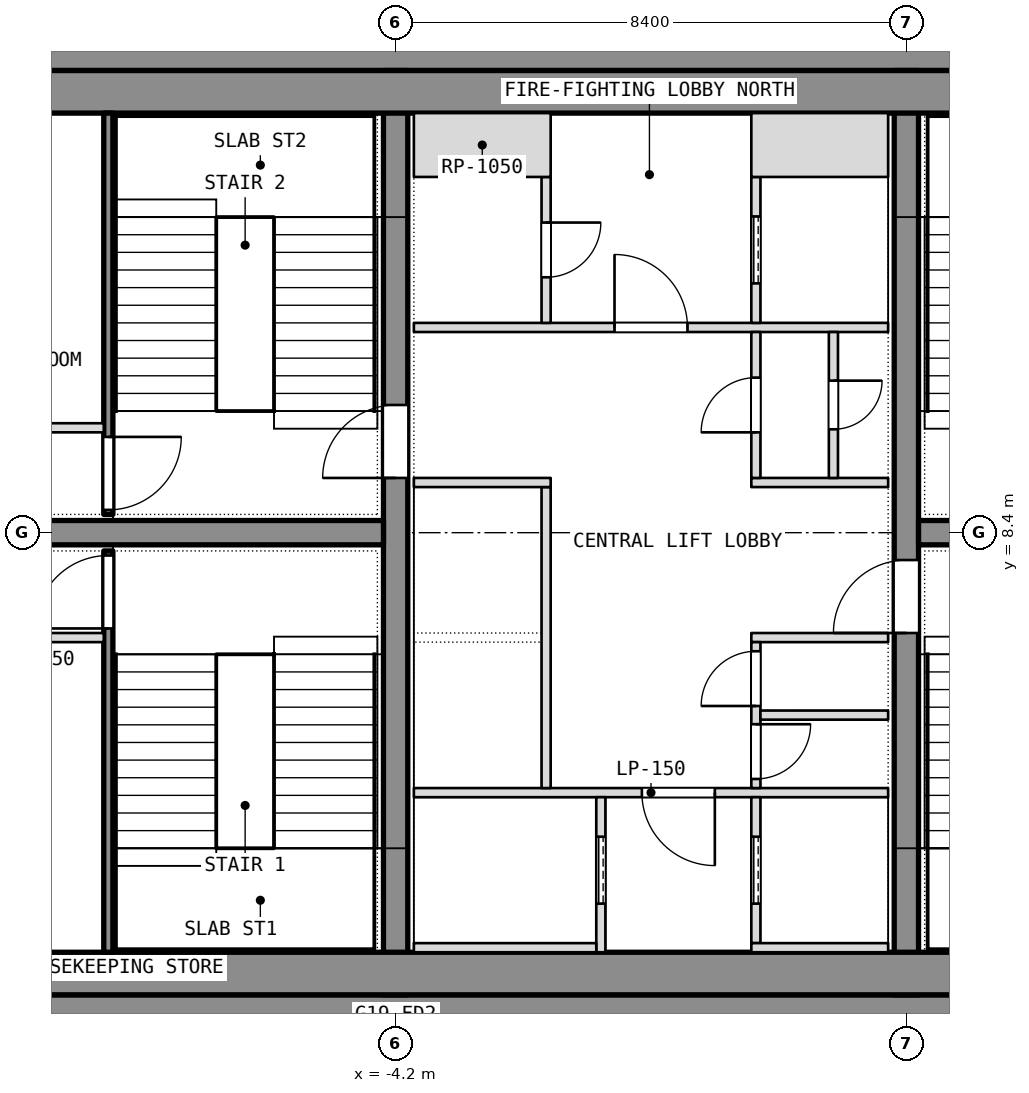
"""IFC4 building model, lengths in metres.
Left out: names, types, materials, properties, quantities, classifications, styles, units other than length and angle.
Written with IfcOpenShell. Run it as: python <this file> out.ifc"""

import sys

from ifc_helpers import new_model, si_unit, direction, frame, frame_2d, origin, place, context, subcontext, project, spatial, rectangle, extrude, element, fill, save


model = new_model("IFC4")
c1 = context("Model", 3, precision=1e-05, world=origin(), true_north=direction((0.0, 1.0)))
c2 = subcontext(c1, "Body", "Model", "MODEL_VIEW")
j1 = project(units=[si_unit("LENGTHUNIT", "METRE"), si_unit("PLANEANGLEUNIT", "RADIAN")], contexts=[c1])
p1 = place(None, origin())
s1 = spatial("IfcSite", under=j1, at=p1, CompositionType="ELEMENT")
p2 = place(p1, origin())
s2 = spatial("IfcBuilding", under=s1, at=p2, CompositionType="ELEMENT")
p3 = place(p2, frame((0.0, 0.0, 220.1)))
s3 = spatial("IfcBuildingStorey", under=s2, at=p3, CompositionType="ELEMENT", Elevation=220.1)
for number, where, z_axis, x_axis in (
    (1, (-11.1, 0.4, 0.0), (0.0, 0.0, 1.0), (1.0, 0.0, 0.0)),
    (2, (-11.1, 16.4, 0.0), (0.0, 0.0, 1.0), (1.0, 0.0, 0.0)),
):
    element("IfcWall", number, at=place(p3, frame(where, z_axis=z_axis, x_axis=x_axis)), inside=s3, PredefinedType="SHEAR", context=c2, shape_type="SweptSolid", body=[
        extrude(rectangle(XDim=22.2, YDim=0.8, at=frame_2d((11.1, 0.0))), origin(), (0.0, 0.0, 1.0), 3.6),
    ])
p4 = place(p3, frame((-4.2, 0.8, 0.0), z_axis=(0.0, 0.0, 1.0), x_axis=(0.0, 1.0, 0.0)))
e3 = element("IfcWall", 3, at=p4, inside=s3, PredefinedType="SHEAR", context=c2, shape_type="SweptSolid", body=[
    extrude(rectangle(XDim=15.2, YDim=0.4, at=frame_2d((7.6, 0.0))), origin(), (0.0, 0.0, 1.0), 3.6),
])
p5 = place(p4, frame((8.5, 0.0, 0.0)))
e4 = element("IfcOpeningElement", 4, at=p5, cuts=e3, PredefinedType="OPENING", context=c2, shape_type="SweptSolid", body=[
    extrude(rectangle(XDim=1.2, YDim=2.1, at=frame_2d((0.6, 1.05))), frame((0.0, 0.2, 0.0), z_axis=(0.0, -1.0, 0.0), x_axis=(1.0, 0.0, 0.0)), (0.0, 0.0, 1.0), 0.4),
])
p6 = place(p3, frame((4.2, 0.8, 0.0), z_axis=(0.0, 0.0, 1.0), x_axis=(0.0, 1.0, 0.0)))
e5 = element("IfcWall", 5, at=p6, inside=s3, PredefinedType="SHEAR", context=c2, shape_type="SweptSolid", body=[
    extrude(rectangle(XDim=15.2, YDim=0.4, at=frame_2d((7.6, 0.0))), origin(), (0.0, 0.0, 1.0), 3.6),
])
p7 = place(p6, frame((5.95, 0.0, 0.0)))
e6 = element("IfcOpeningElement", 6, at=p7, cuts=e5, PredefinedType="OPENING", context=c2, shape_type="SweptSolid", body=[
    extrude(rectangle(XDim=1.2, YDim=2.1, at=frame_2d((0.6, 1.05))), frame((0.0, 0.2, 0.0), z_axis=(0.0, -1.0, 0.0), x_axis=(1.0, 0.0, 0.0)), (0.0, 0.0, 1.0), 0.4),
])
for number, where, z_axis, x_axis in (
    (7, (-11.1, 8.4, 0.0), (0.0, 0.0, 1.0), (1.0, 0.0, 0.0)),
    (8, (4.4, 8.4, 0.0), (0.0, 0.0, 1.0), (1.0, 0.0, 0.0)),
):
    element("IfcWall", number, at=place(p3, frame(where, z_axis=z_axis, x_axis=x_axis)), inside=s3, PredefinedType="SHEAR", context=c2, shape_type="SweptSolid", body=[
        extrude(rectangle(XDim=6.7, YDim=0.4, at=frame_2d((3.35, 0.0))), origin(), (0.0, 0.0, 1.0), 3.6),
    ])
for number, where, z_axis, x_axis in (
    (9, (-11.1, 1.15, 0.0), (0.0, 0.0, 1.0), (1.0, 0.0, 0.0)),
    (10, (-11.1, 15.65, 0.0), (0.0, 0.0, 1.0), (1.0, 0.0, 0.0)),
):
    element("IfcWall", number, at=place(p3, frame(where, z_axis=z_axis, x_axis=x_axis)), inside=s3, PredefinedType="PARTITIONING", context=c2, shape_type="SweptSolid", body=[
        extrude(rectangle(XDim=22.2, YDim=0.7, at=frame_2d((11.1, 0.0))), origin(), (0.0, 0.0, 1.0), 3.34),
    ])
p8 = place(p3, frame((-8.925, 1.5, 0.0), z_axis=(0.0, 0.0, 1.0), x_axis=(0.0, 1.0, 0.0)))
e11 = element("IfcWall", 11, at=p8, inside=s3, PredefinedType="SHEAR", context=c2, shape_type="SweptSolid", body=[
    extrude(rectangle(XDim=6.6, YDim=0.15, at=frame_2d((3.3, 0.0))), origin(), (0.0, 0.0, 1.0), 3.34),
])
p9 = place(p8, frame((5.325, 0.0, 0.0)))
e12 = element("IfcOpeningElement", 12, at=p9, cuts=e11, PredefinedType="OPENING", context=c2, shape_type="SweptSolid", body=[
    extrude(rectangle(XDim=1.2, YDim=2.1, at=frame_2d((0.6, 1.05))), frame((0.0, 0.075, 0.0), z_axis=(0.0, -1.0, 0.0), x_axis=(1.0, 0.0, 0.0)), (0.0, 0.0, 1.0), 0.15),
])
p10 = place(p3, frame((-11.1, 6.675, 0.0), z_axis=(0.0, 0.0, 1.0), x_axis=(1.0, 0.0, 0.0)))
e13 = element("IfcWall", 13, at=p10, inside=s3, PredefinedType="PARTITIONING", context=c2, shape_type="SweptSolid", body=[
    extrude(rectangle(XDim=2.1, YDim=0.15, at=frame_2d((1.05, 0.0))), origin(), (0.0, 0.0, 1.0), 3.34),
])
p11 = place(p3, frame((-8.925, 8.7, 0.0), z_axis=(0.0, 0.0, 1.0), x_axis=(0.0, 1.0, 0.0)))
e14 = element("IfcWall", 14, at=p11, inside=s3, PredefinedType="SHEAR", context=c2, shape_type="SweptSolid", body=[
    extrude(rectangle(XDim=6.6, YDim=0.15, at=frame_2d((3.3, 0.0))), origin(), (0.0, 0.0, 1.0), 3.34),
])
p12 = place(p11, frame((0.075, 0.0, 0.0)))
e15 = element("IfcOpeningElement", 15, at=p12, cuts=e14, PredefinedType="OPENING", context=c2, shape_type="SweptSolid", body=[
    extrude(rectangle(XDim=1.2, YDim=2.1, at=frame_2d((0.6, 1.05))), frame((0.0, 0.075, 0.0), z_axis=(0.0, -1.0, 0.0), x_axis=(1.0, 0.0, 0.0)), (0.0, 0.0, 1.0), 0.15),
])
p13 = place(p3, frame((-11.1, 10.125, 0.0), z_axis=(0.0, 0.0, 1.0), x_axis=(1.0, 0.0, 0.0)))
e16 = element("IfcWall", 16, at=p13, inside=s3, PredefinedType="PARTITIONING", context=c2, shape_type="SweptSolid", body=[
    extrude(rectangle(XDim=2.1, YDim=0.15, at=frame_2d((1.05, 0.0))), origin(), (0.0, 0.0, 1.0), 3.34),
])
p14 = place(p3, frame((-3.9, 4.125, 0.0), z_axis=(0.0, 0.0, 1.0), x_axis=(1.0, 0.0, 0.0)))
e17 = element("IfcWall", 17, at=p14, inside=s3, PredefinedType="PARTITIONING", context=c2, shape_type="SweptSolid", body=[
    extrude(rectangle(XDim=7.8, YDim=0.15, at=frame_2d((3.9, 0.0))), origin(), (0.0, 0.0, 1.0), 3.34),
])
p15 = place(p14, frame((3.75, 0.0, 0.0)))
e18 = element("IfcOpeningElement", 18, at=p15, cuts=e17, PredefinedType="OPENING", context=c2, shape_type="SweptSolid", body=[
    extrude(rectangle(XDim=1.2, YDim=2.1, at=frame_2d((0.6, 1.05))), frame((0.0, 0.075, 0.0), z_axis=(0.0, -1.0, 0.0), x_axis=(1.0, 0.0, 0.0)), (0.0, 0.0, 1.0), 0.15),
])
p16 = place(p3, frame((-3.9, 11.775, 0.0), z_axis=(0.0, 0.0, 1.0), x_axis=(1.0, 0.0, 0.0)))
e19 = element("IfcWall", 19, at=p16, inside=s3, PredefinedType="PARTITIONING", context=c2, shape_type="SweptSolid", body=[
    extrude(rectangle(XDim=7.8, YDim=0.15, at=frame_2d((3.9, 0.0))), origin(), (0.0, 0.0, 1.0), 3.34),
])
p17 = place(p16, frame((3.3, 0.0, 0.0)))
e20 = element("IfcOpeningElement", 20, at=p17, cuts=e19, PredefinedType="OPENING", context=c2, shape_type="SweptSolid", body=[
    extrude(rectangle(XDim=1.2, YDim=2.1, at=frame_2d((0.6, 1.05))), frame((0.0, 0.075, 0.0), z_axis=(0.0, -1.0, 0.0), x_axis=(1.0, 0.0, 0.0)), (0.0, 0.0, 1.0), 0.15),
])
p18 = place(p3, frame((-0.825, 1.5, 0.0), z_axis=(0.0, 0.0, 1.0), x_axis=(0.0, 1.0, 0.0)))
e21 = element("IfcWall", 21, at=p18, inside=s3, PredefinedType="SHEAR", context=c2, shape_type="SweptSolid", body=[
    extrude(rectangle(XDim=2.55, YDim=0.15, at=frame_2d((1.275, 0.0))), origin(), (0.0, 0.0, 1.0), 3.6),
])
p19 = place(p18, frame((0.8, 0.0, 0.0)))
e22 = element("IfcOpeningElement", 22, at=p19, cuts=e21, PredefinedType="OPENING", context=c2, shape_type="SweptSolid", body=[
    extrude(rectangle(XDim=1.1, YDim=2.1, at=frame_2d((0.55, 1.05))), frame((0.0, 0.075, 0.0), z_axis=(0.0, -1.0, 0.0), x_axis=(1.0, 0.0, 0.0)), (0.0, 0.0, 1.0), 0.15),
])
p20 = place(p3, frame((-3.9, 1.575, 0.0), z_axis=(0.0, 0.0, 1.0), x_axis=(1.0, 0.0, 0.0)))
e23 = element("IfcWall", 23, at=p20, inside=s3, PredefinedType="SHEAR", context=c2, shape_type="SweptSolid", body=[
    extrude(rectangle(XDim=3.0, YDim=0.15, at=frame_2d((1.5, 0.0))), origin(), (0.0, 0.0, 1.0), 3.6),
])
p21 = place(p3, frame((-1.725, 4.2, 0.0), z_axis=(0.0, 0.0, 1.0), x_axis=(0.0, 1.0, 0.0)))
e24 = element("IfcWall", 24, at=p21, inside=s3, PredefinedType="SHEAR", context=c2, shape_type="SweptSolid", body=[
    extrude(rectangle(XDim=4.95, YDim=0.15, at=frame_2d((2.475, 0.0))), origin(), (0.0, 0.0, 1.0), 3.6),
])
p22 = place(p3, frame((-3.9, 9.225, 0.0), z_axis=(0.0, 0.0, 1.0), x_axis=(1.0, 0.0, 0.0)))
e25 = element("IfcWall", 25, at=p22, inside=s3, PredefinedType="SHEAR", context=c2, shape_type="SweptSolid", body=[
    extrude(rectangle(XDim=2.25, YDim=0.15, at=frame_2d((1.125, 0.0))), origin(), (0.0, 0.0, 1.0), 3.6),
])
p23 = place(p3, frame((-1.725, 11.85, 0.0), z_axis=(0.0, 0.0, 1.0), x_axis=(0.0, 1.0, 0.0)))
e26 = element("IfcWall", 26, at=p23, inside=s3, PredefinedType="PARTITIONING", context=c2, shape_type="SweptSolid", body=[
    extrude(rectangle(XDim=2.4, YDim=0.15, at=frame_2d((1.2, 0.0))), origin(), (0.0, 0.0, 1.0), 3.34),
])
p24 = place(p23, frame((0.75, 0.0, 0.0)))
e27 = element("IfcOpeningElement", 27, at=p24, cuts=e26, PredefinedType="OPENING", context=c2, shape_type="SweptSolid", body=[
    extrude(rectangle(XDim=0.9, YDim=2.1, at=frame_2d((0.45, 1.05))), frame((0.0, 0.075, 0.0), z_axis=(0.0, -1.0, 0.0), x_axis=(1.0, 0.0, 0.0)), (0.0, 0.0, 1.0), 0.15),
])
p25 = place(p3, frame((-3.9, 14.775, 0.0), z_axis=(0.0, 0.0, 1.0), x_axis=(1.0, 0.0, 0.0)))
e28 = element("IfcWall", 28, at=p25, inside=s3, PredefinedType="PARTITIONING", context=c2, shape_type="SweptSolid", body=[
    extrude(rectangle(XDim=2.25, YDim=1.05, at=frame_2d((1.125, 0.0))), origin(), (0.0, 0.0, 1.0), 3.34),
])
p26 = place(p3, frame((1.725, 1.65, 0.0), z_axis=(0.0, 0.0, 1.0), x_axis=(0.0, 1.0, 0.0)))
e29 = element("IfcWall", 29, at=p26, inside=s3, PredefinedType="SHEAR", context=c2, shape_type="SweptSolid", body=[
    extrude(rectangle(XDim=2.4, YDim=0.15, at=frame_2d((1.2, 0.0))), origin(), (0.0, 0.0, 1.0), 3.6),
])
p27 = place(p26, frame((0.65, 0.0, 0.0)))
e30 = element("IfcOpeningElement", 30, at=p27, cuts=e29, PredefinedType="OPENING", context=c2, shape_type="SweptSolid", body=[
    extrude(rectangle(XDim=1.1, YDim=2.1, at=frame_2d((0.55, 1.05))), frame((0.0, 0.075, 0.0), z_axis=(0.0, -1.0, 0.0), x_axis=(1.0, 0.0, 0.0)), (0.0, 0.0, 1.0), 0.15),
])
p28 = place(p3, frame((1.65, 1.575, 0.0), z_axis=(0.0, 0.0, 1.0), x_axis=(1.0, 0.0, 0.0)))
e31 = element("IfcWall", 31, at=p28, inside=s3, PredefinedType="SHEAR", context=c2, shape_type="SweptSolid", body=[
    extrude(rectangle(XDim=2.25, YDim=0.15, at=frame_2d((1.125, 0.0))), origin(), (0.0, 0.0, 1.0), 3.6),
])
p29 = place(p3, frame((1.725, 11.85, 0.0), z_axis=(0.0, 0.0, 1.0), x_axis=(0.0, 1.0, 0.0)))
e32 = element("IfcWall", 32, at=p29, inside=s3, PredefinedType="SHEAR", context=c2, shape_type="SweptSolid", body=[
    extrude(rectangle(XDim=2.4, YDim=0.15, at=frame_2d((1.2, 0.0))), origin(), (0.0, 0.0, 1.0), 3.6),
])
p30 = place(p29, frame((0.65, 0.0, 0.0)))
e33 = element("IfcOpeningElement", 33, at=p30, cuts=e32, PredefinedType="OPENING", context=c2, shape_type="SweptSolid", body=[
    extrude(rectangle(XDim=1.1, YDim=2.1, at=frame_2d((0.55, 1.05))), frame((0.0, 0.075, 0.0), z_axis=(0.0, -1.0, 0.0), x_axis=(1.0, 0.0, 0.0)), (0.0, 0.0, 1.0), 0.15),
])
p31 = place(p3, frame((1.65, 14.775, 0.0), z_axis=(0.0, 0.0, 1.0), x_axis=(1.0, 0.0, 0.0)))
e34 = element("IfcWall", 34, at=p31, inside=s3, PredefinedType="SHEAR", context=c2, shape_type="SweptSolid", body=[
    extrude(rectangle(XDim=2.25, YDim=1.05, at=frame_2d((1.125, 0.0))), origin(), (0.0, 0.0, 1.0), 3.6),
])
for number, where, z_axis, x_axis in (
    (35, (1.65, 6.675, 0.0), (0.0, 0.0, 1.0), (1.0, 0.0, 0.0)),
    (36, (1.65, 9.225, 0.0), (0.0, 0.0, 1.0), (1.0, 0.0, 0.0)),
):
    element("IfcWall", number, at=place(p3, frame(where, z_axis=z_axis, x_axis=x_axis)), inside=s3, PredefinedType="PARTITIONING", context=c2, shape_type="SweptSolid", body=[
        extrude(rectangle(XDim=2.25, YDim=0.15, at=frame_2d((1.125, 0.0))), origin(), (0.0, 0.0, 1.0), 3.34),
    ])
p32 = place(p3, frame((1.725, 4.2, 0.0), z_axis=(0.0, 0.0, 1.0), x_axis=(0.0, 1.0, 0.0)))
e37 = element("IfcWall", 37, at=p32, inside=s3, PredefinedType="PARTITIONING", context=c2, shape_type="SweptSolid", body=[
    extrude(rectangle(XDim=2.4, YDim=0.15, at=frame_2d((1.2, 0.0))), origin(), (0.0, 0.0, 1.0), 3.34),
])
p33 = place(p32, frame((0.15, 0.0, 0.0)))
e38 = element("IfcOpeningElement", 38, at=p33, cuts=e37, PredefinedType="OPENING", context=c2, shape_type="SweptSolid", body=[
    extrude(rectangle(XDim=0.9, YDim=2.1, at=frame_2d((0.45, 1.05))), frame((0.0, 0.075, 0.0), z_axis=(0.0, -1.0, 0.0), x_axis=(1.0, 0.0, 0.0)), (0.0, 0.0, 1.0), 0.15),
])
p34 = place(p32, frame((1.35, 0.0, 0.0)))
e39 = element("IfcOpeningElement", 39, at=p34, cuts=e37, PredefinedType="OPENING", context=c2, shape_type="SweptSolid", body=[
    extrude(rectangle(XDim=0.9, YDim=2.1, at=frame_2d((0.45, 1.05))), frame((0.0, 0.075, 0.0), z_axis=(0.0, -1.0, 0.0), x_axis=(1.0, 0.0, 0.0)), (0.0, 0.0, 1.0), 0.15),
])
p35 = place(p3, frame((1.725, 9.3, 0.0), z_axis=(0.0, 0.0, 1.0), x_axis=(0.0, 1.0, 0.0)))
e40 = element("IfcWall", 40, at=p35, inside=s3, PredefinedType="PARTITIONING", context=c2, shape_type="SweptSolid", body=[
    extrude(rectangle(XDim=2.4, YDim=0.15, at=frame_2d((1.2, 0.0))), origin(), (0.0, 0.0, 1.0), 3.34),
])
p36 = place(p35, frame((0.75, 0.0, 0.0)))
e41 = element("IfcOpeningElement", 41, at=p36, cuts=e40, PredefinedType="OPENING", context=c2, shape_type="SweptSolid", body=[
    extrude(rectangle(XDim=0.9, YDim=2.1, at=frame_2d((0.45, 1.05))), frame((0.0, 0.075, 0.0), z_axis=(0.0, -1.0, 0.0), x_axis=(1.0, 0.0, 0.0)), (0.0, 0.0, 1.0), 0.15),
])
p37 = place(p3, frame((1.8, 5.4, 0.0), z_axis=(0.0, 0.0, 1.0), x_axis=(1.0, 0.0, 0.0)))
e42 = element("IfcWall", 42, at=p37, inside=s3, PredefinedType="PARTITIONING", context=c2, shape_type="SweptSolid", body=[
    extrude(rectangle(XDim=2.1, YDim=0.15, at=frame_2d((1.05, 0.0))), origin(), (0.0, 0.0, 1.0), 3.34),
])
p38 = place(p3, frame((3.0, 9.3, 0.0), z_axis=(0.0, 0.0, 1.0), x_axis=(0.0, 1.0, 0.0)))
e43 = element("IfcWall", 43, at=p38, inside=s3, PredefinedType="PARTITIONING", context=c2, shape_type="SweptSolid", body=[
    extrude(rectangle(XDim=2.4, YDim=0.15, at=frame_2d((1.2, 0.0))), origin(), (0.0, 0.0, 1.0), 3.34),
])
p39 = place(p38, frame((0.8, 0.0, 0.0)))
e44 = element("IfcOpeningElement", 44, at=p39, cuts=e43, PredefinedType="OPENING", context=c2, shape_type="SweptSolid", body=[
    extrude(rectangle(XDim=0.8, YDim=2.1, at=frame_2d((0.4, 1.05))), frame((0.0, 0.075, 0.0), z_axis=(0.0, -1.0, 0.0), x_axis=(1.0, 0.0, 0.0)), (0.0, 0.0, 1.0), 0.15),
])
p40 = place(p9, origin())
e45 = element("IfcDoor", 45, at=p40, inside=s3, OperationType="SINGLE_SWING_LEFT", PredefinedType="DOOR", context=c2, shape_type="SweptSolid", body=[
    extrude(rectangle(XDim=1.2, YDim=2.1, at=frame_2d((0.6, 1.05))), frame((0.0, 0.025, 0.0), z_axis=(0.0, -1.0, 0.0), x_axis=(1.0, 0.0, 0.0)), (0.0, 0.0, 1.0), 0.05),
])
fill(e12, e45)
p41 = place(p12, origin())
e46 = element("IfcDoor", 46, at=p41, inside=s3, OperationType="SINGLE_SWING_LEFT", PredefinedType="DOOR", context=c2, shape_type="SweptSolid", body=[
    extrude(rectangle(XDim=1.2, YDim=2.1, at=frame_2d((0.6, 1.05))), frame((0.0, 0.025, 0.0), z_axis=(0.0, -1.0, 0.0), x_axis=(1.0, 0.0, 0.0)), (0.0, 0.0, 1.0), 0.05),
])
fill(e15, e46)
p42 = place(p33, origin())
e47 = element("IfcDoor", 47, at=p42, inside=s3, OperationType="SINGLE_SWING_LEFT", PredefinedType="DOOR", context=c2, shape_type="SweptSolid", body=[
    extrude(rectangle(XDim=0.9, YDim=2.1, at=frame_2d((0.45, 1.05))), frame((0.0, 0.025, 0.0), z_axis=(0.0, -1.0, 0.0), x_axis=(1.0, 0.0, 0.0)), (0.0, 0.0, 1.0), 0.05),
])
fill(e38, e47)
p43 = place(p34, origin())
e48 = element("IfcDoor", 48, at=p43, inside=s3, OperationType="SINGLE_SWING_LEFT", PredefinedType="DOOR", context=c2, shape_type="SweptSolid", body=[
    extrude(rectangle(XDim=0.9, YDim=2.1, at=frame_2d((0.45, 1.05))), frame((0.0, 0.025, 0.0), z_axis=(0.0, -1.0, 0.0), x_axis=(1.0, 0.0, 0.0)), (0.0, 0.0, 1.0), 0.05),
])
fill(e39, e48)
p44 = place(p36, origin())
e49 = element("IfcDoor", 49, at=p44, inside=s3, OperationType="SINGLE_SWING_LEFT", PredefinedType="DOOR", context=c2, shape_type="SweptSolid", body=[
    extrude(rectangle(XDim=0.9, YDim=2.1, at=frame_2d((0.45, 1.05))), frame((0.0, 0.025, 0.0), z_axis=(0.0, -1.0, 0.0), x_axis=(1.0, 0.0, 0.0)), (0.0, 0.0, 1.0), 0.05),
])
fill(e41, e49)
p45 = place(p39, origin())
e50 = element("IfcDoor", 50, at=p45, inside=s3, OperationType="SINGLE_SWING_LEFT", PredefinedType="DOOR", context=c2, shape_type="SweptSolid", body=[
    extrude(rectangle(XDim=0.8, YDim=2.1, at=frame_2d((0.4, 1.05))), frame((0.0, 0.025, 0.0), z_axis=(0.0, -1.0, 0.0), x_axis=(1.0, 0.0, 0.0)), (0.0, 0.0, 1.0), 0.05),
])
fill(e44, e50)
p46 = place(p19, origin())
e51 = element("IfcDoor", 51, at=p46, inside=s3, OperationType="SLIDING_TO_LEFT", PredefinedType="DOOR", context=c2, shape_type="SweptSolid", body=[
    extrude(rectangle(XDim=1.1, YDim=2.1, at=frame_2d((0.55, 1.05))), frame((0.0, 0.025, 0.0), z_axis=(0.0, -1.0, 0.0), x_axis=(1.0, 0.0, 0.0)), (0.0, 0.0, 1.0), 0.05),
])
fill(e22, e51)
p47 = place(p27, origin())
e52 = element("IfcDoor", 52, at=p47, inside=s3, OperationType="SLIDING_TO_LEFT", PredefinedType="DOOR", context=c2, shape_type="SweptSolid", body=[
    extrude(rectangle(XDim=1.1, YDim=2.1, at=frame_2d((0.55, 1.05))), frame((0.0, 0.025, 0.0), z_axis=(0.0, -1.0, 0.0), x_axis=(1.0, 0.0, 0.0)), (0.0, 0.0, 1.0), 0.05),
])
fill(e30, e52)
p48 = place(p30, origin())
e53 = element("IfcDoor", 53, at=p48, inside=s3, OperationType="SLIDING_TO_LEFT", PredefinedType="DOOR", context=c2, shape_type="SweptSolid", body=[
    extrude(rectangle(XDim=1.1, YDim=2.1, at=frame_2d((0.55, 1.05))), frame((0.0, 0.025, 0.0), z_axis=(0.0, -1.0, 0.0), x_axis=(1.0, 0.0, 0.0)), (0.0, 0.0, 1.0), 0.05),
])
fill(e33, e53)
p49 = place(p15, origin())
e54 = element("IfcDoor", 54, at=p49, inside=s3, OperationType="SINGLE_SWING_LEFT", PredefinedType="DOOR", context=c2, shape_type="SweptSolid", body=[
    extrude(rectangle(XDim=1.2, YDim=2.1, at=frame_2d((0.6, 1.05))), frame((0.0, 0.025, 0.0), z_axis=(0.0, -1.0, 0.0), x_axis=(1.0, 0.0, 0.0)), (0.0, 0.0, 1.0), 0.05),
])
fill(e18, e54)
p50 = place(p17, origin())
e55 = element("IfcDoor", 55, at=p50, inside=s3, OperationType="SINGLE_SWING_LEFT", PredefinedType="DOOR", context=c2, shape_type="SweptSolid", body=[
    extrude(rectangle(XDim=1.2, YDim=2.1, at=frame_2d((0.6, 1.05))), frame((0.0, 0.025, 0.0), z_axis=(0.0, -1.0, 0.0), x_axis=(1.0, 0.0, 0.0)), (0.0, 0.0, 1.0), 0.05),
])
fill(e20, e55)
p51 = place(p24, origin())
e56 = element("IfcDoor", 56, at=p51, inside=s3, OperationType="SINGLE_SWING_LEFT", PredefinedType="DOOR", context=c2, shape_type="SweptSolid", body=[
    extrude(rectangle(XDim=0.9, YDim=2.1, at=frame_2d((0.45, 1.05))), frame((0.0, 0.025, 0.0), z_axis=(0.0, -1.0, 0.0), x_axis=(1.0, 0.0, 0.0)), (0.0, 0.0, 1.0), 0.05),
])
fill(e27, e56)
p52 = place(p5, origin())
e57 = element("IfcDoor", 57, at=p52, inside=s3, OperationType="SINGLE_SWING_LEFT", PredefinedType="DOOR", context=c2, shape_type="SweptSolid", body=[
    extrude(rectangle(XDim=1.2, YDim=2.1, at=frame_2d((0.6, 1.05))), frame((0.0, 0.025, 0.0), z_axis=(0.0, -1.0, 0.0), x_axis=(1.0, 0.0, 0.0)), (0.0, 0.0, 1.0), 0.05),
])
fill(e4, e57)
p53 = place(p7, origin())
e58 = element("IfcDoor", 58, at=p53, inside=s3, OperationType="SINGLE_SWING_LEFT", PredefinedType="DOOR", context=c2, shape_type="SweptSolid", body=[
    extrude(rectangle(XDim=1.2, YDim=2.1, at=frame_2d((0.6, 1.05))), frame((0.0, 0.025, 0.0), z_axis=(0.0, -1.0, 0.0), x_axis=(1.0, 0.0, 0.0)), (0.0, 0.0, 1.0), 0.05),
])
fill(e6, e58)
save(model, sys.argv[1])
